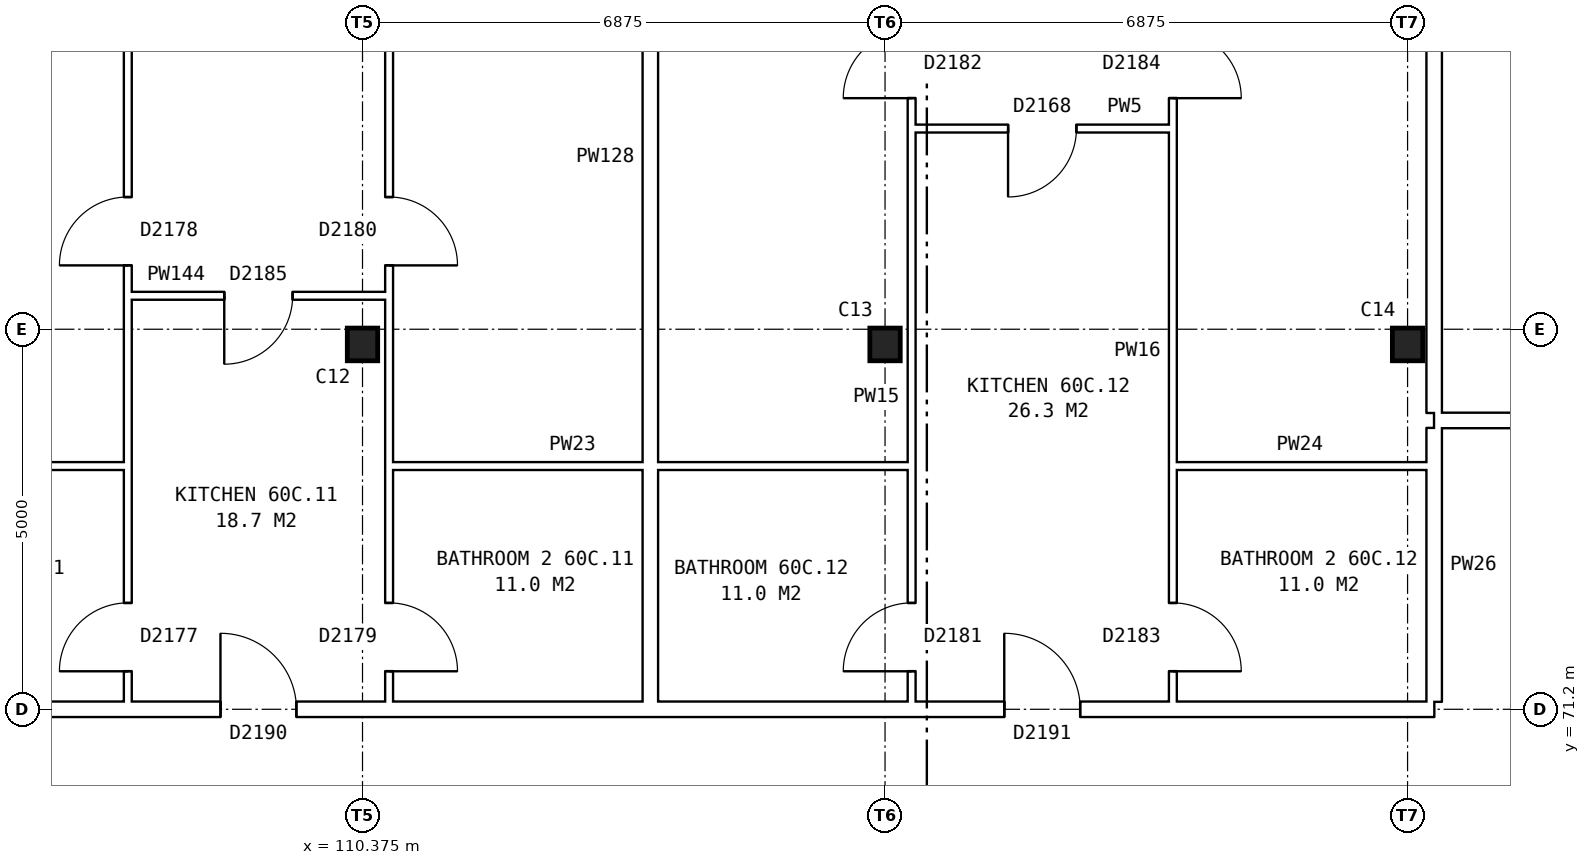
"""IFC4 building model, lengths in metres.
Left out: names, types, materials, properties, quantities, classifications, styles, units other than length and angle.
Written with IfcOpenShell. Run it as: python <this file> out.ifc"""

import sys

from ifc_helpers import new_model, si_unit, direction, frame, frame_2d, origin, origin_2d, place, context, subcontext, project, spatial, rectangle, i_section, extrude, element, fill, save


model = new_model("IFC4")
c1 = context("Model", 3, precision=1e-05, world=origin(), true_north=direction((0.0, 1.0)))
c2 = subcontext(c1, "Body", "Model", "MODEL_VIEW")
j1 = project(units=[si_unit("LENGTHUNIT", "METRE"), si_unit("PLANEANGLEUNIT", "RADIAN")], contexts=[c1])
p1 = place(None, origin())
s1 = spatial("IfcSite", under=j1, at=p1, CompositionType="ELEMENT")
p2 = place(p1, origin())
s2 = spatial("IfcBuilding", under=s1, at=p2, CompositionType="ELEMENT")
p3 = place(p2, frame((0.0, 0.0, 212.1)))
s3 = spatial("IfcBuildingStorey", under=s2, at=p3, CompositionType="ELEMENT", Elevation=212.1)
for number, where, z_axis, x_axis in (
    (1, (110.375, 76.0, 0.0), (0.0, 0.0, 1.0), (1.0, 0.0, 0.0)),
    (2, (117.25, 76.0, 0.0), (0.0, 0.0, 1.0), (1.0, 0.0, 0.0)),
    (3, (124.125, 76.0, 0.0), (0.0, 0.0, 1.0), (1.0, 0.0, 0.0)),
):
    element("IfcColumn", number, at=place(p3, frame(where, z_axis=z_axis, x_axis=x_axis)), inside=s3, PredefinedType="COLUMN", context=c2, shape_type="SweptSolid", body=[
        extrude(i_section(OverallWidth=0.4, OverallDepth=0.43, WebThickness=0.04, FlangeThickness=0.04, at=origin_2d()), origin(), (0.0, 0.0, 1.0), 2.85),
    ])
p4 = place(p3, frame((83.225, 71.2, 0.0), z_axis=(0.0, 0.0, 1.0), x_axis=(1.0, 0.0, 0.0)))
e4 = element("IfcWall", 4, at=p4, inside=s3, PredefinedType="PARTITIONING", context=c2, shape_type="SweptSolid", body=[
    extrude(rectangle(XDim=41.25, YDim=0.2, at=frame_2d((20.625, 0.0))), origin(), (0.0, 0.0, 1.0), 2.85),
])
p5 = place(p4, frame((4.656, 0.0, 0.0)))
e5 = element("IfcOpeningElement", 5, at=p5, cuts=e4, PredefinedType="OPENING", context=c2, shape_type="SweptSolid", body=[
    extrude(rectangle(XDim=1.0, YDim=2.1, at=frame_2d((0.5, 1.05))), frame((0.0, 0.11, 0.0), z_axis=(0.0, -1.0, 0.0), x_axis=(1.0, 0.0, 0.0)), (0.0, 0.0, 1.0), 0.22),
])
p6 = place(p4, frame((14.969, 0.0, 0.0)))
e6 = element("IfcOpeningElement", 6, at=p6, cuts=e4, PredefinedType="OPENING", context=c2, shape_type="SweptSolid", body=[
    extrude(rectangle(XDim=1.0, YDim=2.1, at=frame_2d((0.5, 1.05))), frame((0.0, 0.11, 0.0), z_axis=(0.0, -1.0, 0.0), x_axis=(1.0, 0.0, 0.0)), (0.0, 0.0, 1.0), 0.22),
])
p7 = place(p4, frame((25.281, 0.0, 0.0)))
e7 = element("IfcOpeningElement", 7, at=p7, cuts=e4, PredefinedType="OPENING", context=c2, shape_type="SweptSolid", body=[
    extrude(rectangle(XDim=1.0, YDim=2.1, at=frame_2d((0.5, 1.05))), frame((0.0, 0.11, 0.0), z_axis=(0.0, -1.0, 0.0), x_axis=(1.0, 0.0, 0.0)), (0.0, 0.0, 1.0), 0.22),
])
p8 = place(p4, frame((35.594, 0.0, 0.0)))
e8 = element("IfcOpeningElement", 8, at=p8, cuts=e4, PredefinedType="OPENING", context=c2, shape_type="SweptSolid", body=[
    extrude(rectangle(XDim=1.0, YDim=2.1, at=frame_2d((0.5, 1.05))), frame((0.0, 0.11, 0.0), z_axis=(0.0, -1.0, 0.0), x_axis=(1.0, 0.0, 0.0)), (0.0, 0.0, 1.0), 0.22),
])
for number, where, z_axis, x_axis in (
    (9, (100.412, 74.4, 0.0), (0.0, 0.0, 1.0), (1.0, 0.0, 0.0)),
    (10, (110.725, 74.4, 0.0), (0.0, 0.0, 1.0), (1.0, 0.0, 0.0)),
):
    element("IfcWall", number, at=place(p3, frame(where, z_axis=z_axis, x_axis=x_axis)), inside=s3, PredefinedType="PARTITIONING", context=c2, shape_type="SweptSolid", body=[
        extrude(rectangle(XDim=6.875, YDim=0.1, at=frame_2d((3.438, 0.0))), origin(), (0.0, 0.0, 1.0), 2.85),
    ])
p9 = place(p3, frame((121.037, 74.4, 0.0), z_axis=(0.0, 0.0, 1.0), x_axis=(1.0, 0.0, 0.0)))
e11 = element("IfcWall", 11, at=p9, inside=s3, PredefinedType="PARTITIONING", context=c2, shape_type="SweptSolid", body=[
    extrude(rectangle(XDim=3.338, YDim=0.1, at=frame_2d((1.669, 0.0))), origin(), (0.0, 0.0, 1.0), 2.85),
])
p10 = place(p3, frame((124.475, 75.0, 0.0), z_axis=(0.0, 0.0, 1.0), x_axis=(1.0, 0.0, 0.0)))
e12 = element("IfcWall", 12, at=p10, inside=s3, PredefinedType="PARTITIONING", context=c2, shape_type="SweptSolid", body=[
    extrude(rectangle(XDim=6.885, YDim=0.2, at=frame_2d((3.442, 0.0))), origin(), (0.0, 0.0, 1.0), 2.85),
])
p11 = place(p10, frame((2.992, 0.0, 0.0)))
e13 = element("IfcOpeningElement", 13, at=p11, cuts=e12, PredefinedType="OPENING", context=c2, shape_type="SweptSolid", body=[
    extrude(rectangle(XDim=0.9, YDim=2.1, at=frame_2d((0.45, 1.05))), frame((0.0, 0.11, 0.0), z_axis=(0.0, -1.0, 0.0), x_axis=(1.0, 0.0, 0.0)), (0.0, 0.0, 1.0), 0.22),
])
p12 = place(p3, frame((107.287, 76.64, 0.0), z_axis=(0.0, 0.0, 1.0), x_axis=(1.0, 0.0, 0.0)))
e14 = element("IfcWall", 14, at=p12, inside=s3, PredefinedType="PARTITIONING", context=c2, shape_type="SweptSolid", body=[
    extrude(rectangle(XDim=3.438, YDim=0.1, at=frame_2d((1.719, 0.0))), origin(), (0.0, 0.0, 1.0), 2.85),
])
p13 = place(p12, frame((1.269, 0.0, 0.0)))
e15 = element("IfcOpeningElement", 15, at=p13, cuts=e14, PredefinedType="OPENING", context=c2, shape_type="SweptSolid", body=[
    extrude(rectangle(XDim=0.9, YDim=2.1, at=frame_2d((0.45, 1.05))), frame((0.0, 0.06, 0.0), z_axis=(0.0, -1.0, 0.0), x_axis=(1.0, 0.0, 0.0)), (0.0, 0.0, 1.0), 0.12),
])
p14 = place(p3, frame((117.6, 78.84, 0.0), z_axis=(0.0, 0.0, 1.0), x_axis=(1.0, 0.0, 0.0)))
e16 = element("IfcWall", 16, at=p14, inside=s3, PredefinedType="PARTITIONING", context=c2, shape_type="SweptSolid", body=[
    extrude(rectangle(XDim=3.437, YDim=0.1, at=frame_2d((1.719, 0.0))), origin(), (0.0, 0.0, 1.0), 2.85),
])
p15 = place(p14, frame((1.269, 0.0, 0.0)))
e17 = element("IfcOpeningElement", 17, at=p15, cuts=e16, PredefinedType="OPENING", context=c2, shape_type="SweptSolid", body=[
    extrude(rectangle(XDim=0.9, YDim=2.1, at=frame_2d((0.45, 1.05))), frame((0.0, 0.06, 0.0), z_axis=(0.0, -1.0, 0.0), x_axis=(1.0, 0.0, 0.0)), (0.0, 0.0, 1.0), 0.12),
])
p16 = place(p3, frame((107.287, 71.3, 0.0), z_axis=(0.0, 0.0, 1.0), x_axis=(0.0, 1.0, 0.0)))
e18 = element("IfcWall", 18, at=p16, inside=s3, PredefinedType="PARTITIONING", context=c2, shape_type="SweptSolid", body=[
    extrude(rectangle(XDim=14.34, YDim=0.1, at=frame_2d((7.17, 0.0))), origin(), (0.0, 0.0, 1.0), 2.85),
])
p17 = place(p16, frame((5.74, 0.0, 0.0)))
e19 = element("IfcOpeningElement", 19, at=p17, cuts=e18, PredefinedType="OPENING", context=c2, shape_type="SweptSolid", body=[
    extrude(rectangle(XDim=0.9, YDim=2.1, at=frame_2d((0.45, 1.05))), frame((0.0, 0.06, 0.0), z_axis=(0.0, -1.0, 0.0), x_axis=(1.0, 0.0, 0.0)), (0.0, 0.0, 1.0), 0.12),
])
p18 = place(p16, frame((0.4, 0.0, 0.0)))
e20 = element("IfcOpeningElement", 20, at=p18, cuts=e18, PredefinedType="OPENING", context=c2, shape_type="SweptSolid", body=[
    extrude(rectangle(XDim=0.9, YDim=2.1, at=frame_2d((0.45, 1.05))), frame((0.0, 0.06, 0.0), z_axis=(0.0, -1.0, 0.0), x_axis=(1.0, 0.0, 0.0)), (0.0, 0.0, 1.0), 0.12),
])
p19 = place(p3, frame((110.725, 71.3, 0.0), z_axis=(0.0, 0.0, 1.0), x_axis=(0.0, 1.0, 0.0)))
e21 = element("IfcWall", 21, at=p19, inside=s3, PredefinedType="PARTITIONING", context=c2, shape_type="SweptSolid", body=[
    extrude(rectangle(XDim=14.34, YDim=0.1, at=frame_2d((7.17, 0.0))), origin(), (0.0, 0.0, 1.0), 2.85),
])
p20 = place(p19, frame((5.74, 0.0, 0.0)))
e22 = element("IfcOpeningElement", 22, at=p20, cuts=e21, PredefinedType="OPENING", context=c2, shape_type="SweptSolid", body=[
    extrude(rectangle(XDim=0.9, YDim=2.1, at=frame_2d((0.45, 1.05))), frame((0.0, 0.06, 0.0), z_axis=(0.0, -1.0, 0.0), x_axis=(1.0, 0.0, 0.0)), (0.0, 0.0, 1.0), 0.12),
])
p21 = place(p19, frame((0.4, 0.0, 0.0)))
e23 = element("IfcOpeningElement", 23, at=p21, cuts=e21, PredefinedType="OPENING", context=c2, shape_type="SweptSolid", body=[
    extrude(rectangle(XDim=0.9, YDim=2.1, at=frame_2d((0.45, 1.05))), frame((0.0, 0.06, 0.0), z_axis=(0.0, -1.0, 0.0), x_axis=(1.0, 0.0, 0.0)), (0.0, 0.0, 1.0), 0.12),
])
p22 = place(p3, frame((114.162, 71.3, 0.0), z_axis=(0.0, 0.0, 1.0), x_axis=(0.0, 1.0, 0.0)))
e24 = element("IfcWall", 24, at=p22, inside=s3, PredefinedType="PARTITIONING", context=c2, shape_type="SweptSolid", body=[
    extrude(rectangle(XDim=14.34, YDim=0.2, at=frame_2d((7.17, 0.0))), origin(), (0.0, 0.0, 1.0), 2.85),
])
p23 = place(p3, frame((117.6, 71.3, 0.0), z_axis=(0.0, 0.0, 1.0), x_axis=(0.0, 1.0, 0.0)))
e25 = element("IfcWall", 25, at=p23, inside=s3, PredefinedType="PARTITIONING", context=c2, shape_type="SweptSolid", body=[
    extrude(rectangle(XDim=14.34, YDim=0.1, at=frame_2d((7.17, 0.0))), origin(), (0.0, 0.0, 1.0), 2.85),
])
p24 = place(p23, frame((7.94, 0.0, 0.0)))
e26 = element("IfcOpeningElement", 26, at=p24, cuts=e25, PredefinedType="OPENING", context=c2, shape_type="SweptSolid", body=[
    extrude(rectangle(XDim=0.9, YDim=2.1, at=frame_2d((0.45, 1.05))), frame((0.0, 0.06, 0.0), z_axis=(0.0, -1.0, 0.0), x_axis=(1.0, 0.0, 0.0)), (0.0, 0.0, 1.0), 0.12),
])
p25 = place(p23, frame((0.4, 0.0, 0.0)))
e27 = element("IfcOpeningElement", 27, at=p25, cuts=e25, PredefinedType="OPENING", context=c2, shape_type="SweptSolid", body=[
    extrude(rectangle(XDim=0.9, YDim=2.1, at=frame_2d((0.45, 1.05))), frame((0.0, 0.06, 0.0), z_axis=(0.0, -1.0, 0.0), x_axis=(1.0, 0.0, 0.0)), (0.0, 0.0, 1.0), 0.12),
])
p26 = place(p3, frame((121.037, 71.3, 0.0), z_axis=(0.0, 0.0, 1.0), x_axis=(0.0, 1.0, 0.0)))
e28 = element("IfcWall", 28, at=p26, inside=s3, PredefinedType="PARTITIONING", context=c2, shape_type="SweptSolid", body=[
    extrude(rectangle(XDim=14.34, YDim=0.1, at=frame_2d((7.17, 0.0))), origin(), (0.0, 0.0, 1.0), 2.85),
])
p27 = place(p26, frame((7.94, 0.0, 0.0)))
e29 = element("IfcOpeningElement", 29, at=p27, cuts=e28, PredefinedType="OPENING", context=c2, shape_type="SweptSolid", body=[
    extrude(rectangle(XDim=0.9, YDim=2.1, at=frame_2d((0.45, 1.05))), frame((0.0, 0.06, 0.0), z_axis=(0.0, -1.0, 0.0), x_axis=(1.0, 0.0, 0.0)), (0.0, 0.0, 1.0), 0.12),
])
p28 = place(p26, frame((0.4, 0.0, 0.0)))
e30 = element("IfcOpeningElement", 30, at=p28, cuts=e28, PredefinedType="OPENING", context=c2, shape_type="SweptSolid", body=[
    extrude(rectangle(XDim=0.9, YDim=2.1, at=frame_2d((0.45, 1.05))), frame((0.0, 0.06, 0.0), z_axis=(0.0, -1.0, 0.0), x_axis=(1.0, 0.0, 0.0)), (0.0, 0.0, 1.0), 0.12),
])
p29 = place(p3, frame((124.475, 71.3, 0.0), z_axis=(0.0, 0.0, 1.0), x_axis=(0.0, 1.0, 0.0)))
e31 = element("IfcWall", 31, at=p29, inside=s3, PredefinedType="PARTITIONING", context=c2, shape_type="SweptSolid", body=[
    extrude(rectangle(XDim=3.6, YDim=0.2, at=frame_2d((1.8, 0.0))), origin(), (0.0, 0.0, 1.0), 2.85),
])
p30 = place(p3, frame((124.475, 75.1, 0.0), z_axis=(0.0, 0.0, 1.0), x_axis=(0.0, 1.0, 0.0)))
e32 = element("IfcWall", 32, at=p30, inside=s3, PredefinedType="PARTITIONING", context=c2, shape_type="SweptSolid", body=[
    extrude(rectangle(XDim=10.54, YDim=0.2, at=frame_2d((5.27, 0.0))), origin(), (0.0, 0.0, 1.0), 2.85),
])
p31 = place(p17, origin())
e33 = element("IfcDoor", 33, at=p31, inside=s3, OperationType="SINGLE_SWING_LEFT", PredefinedType="DOOR", context=c2, shape_type="SweptSolid", body=[
    extrude(rectangle(XDim=0.9, YDim=2.1, at=frame_2d((0.45, 1.05))), frame((0.0, 0.025, 0.0), z_axis=(0.0, -1.0, 0.0), x_axis=(1.0, 0.0, 0.0)), (0.0, 0.0, 1.0), 0.05),
])
fill(e19, e33)
p32 = place(p20, frame((0.9, 0.0, 0.0), z_axis=(0.0, 0.0, 1.0), x_axis=(-1.0, 0.0, 0.0)))
e34 = element("IfcDoor", 34, at=p32, inside=s3, OperationType="SINGLE_SWING_RIGHT", PredefinedType="DOOR", context=c2, shape_type="SweptSolid", body=[
    extrude(rectangle(XDim=0.9, YDim=2.1, at=frame_2d((0.45, 1.05))), frame((0.0, 0.025, 0.0), z_axis=(0.0, -1.0, 0.0), x_axis=(1.0, 0.0, 0.0)), (0.0, 0.0, 1.0), 0.05),
])
fill(e22, e34)
p33 = place(p7, origin())
e35 = element("IfcDoor", 35, at=p33, inside=s3, OperationType="SINGLE_SWING_LEFT", PredefinedType="DOOR", context=c2, shape_type="SweptSolid", body=[
    extrude(rectangle(XDim=1.0, YDim=2.1, at=frame_2d((0.5, 1.05))), frame((0.0, 0.025, 0.0), z_axis=(0.0, -1.0, 0.0), x_axis=(1.0, 0.0, 0.0)), (0.0, 0.0, 1.0), 0.05),
])
fill(e7, e35)
p34 = place(p13, frame((0.9, 0.0, 0.0), z_axis=(0.0, 0.0, 1.0), x_axis=(-1.0, 0.0, 0.0)))
e36 = element("IfcDoor", 36, at=p34, inside=s3, OperationType="SINGLE_SWING_RIGHT", PredefinedType="DOOR", context=c2, shape_type="SweptSolid", body=[
    extrude(rectangle(XDim=0.9, YDim=2.1, at=frame_2d((0.45, 1.05))), frame((0.0, 0.025, 0.0), z_axis=(0.0, -1.0, 0.0), x_axis=(1.0, 0.0, 0.0)), (0.0, 0.0, 1.0), 0.05),
])
fill(e15, e36)
p35 = place(p18, origin())
e37 = element("IfcDoor", 37, at=p35, inside=s3, OperationType="SINGLE_SWING_LEFT", PredefinedType="DOOR", context=c2, shape_type="SweptSolid", body=[
    extrude(rectangle(XDim=0.9, YDim=2.1, at=frame_2d((0.45, 1.05))), frame((0.0, 0.025, 0.0), z_axis=(0.0, -1.0, 0.0), x_axis=(1.0, 0.0, 0.0)), (0.0, 0.0, 1.0), 0.05),
])
fill(e20, e37)
p36 = place(p21, frame((0.9, 0.0, 0.0), z_axis=(0.0, 0.0, 1.0), x_axis=(-1.0, 0.0, 0.0)))
e38 = element("IfcDoor", 38, at=p36, inside=s3, OperationType="SINGLE_SWING_RIGHT", PredefinedType="DOOR", context=c2, shape_type="SweptSolid", body=[
    extrude(rectangle(XDim=0.9, YDim=2.1, at=frame_2d((0.45, 1.05))), frame((0.0, 0.025, 0.0), z_axis=(0.0, -1.0, 0.0), x_axis=(1.0, 0.0, 0.0)), (0.0, 0.0, 1.0), 0.05),
])
fill(e23, e38)
p37 = place(p24, origin())
e39 = element("IfcDoor", 39, at=p37, inside=s3, OperationType="SINGLE_SWING_LEFT", PredefinedType="DOOR", context=c2, shape_type="SweptSolid", body=[
    extrude(rectangle(XDim=0.9, YDim=2.1, at=frame_2d((0.45, 1.05))), frame((0.0, 0.025, 0.0), z_axis=(0.0, -1.0, 0.0), x_axis=(1.0, 0.0, 0.0)), (0.0, 0.0, 1.0), 0.05),
])
fill(e26, e39)
p38 = place(p27, frame((0.9, 0.0, 0.0), z_axis=(0.0, 0.0, 1.0), x_axis=(-1.0, 0.0, 0.0)))
e40 = element("IfcDoor", 40, at=p38, inside=s3, OperationType="SINGLE_SWING_RIGHT", PredefinedType="DOOR", context=c2, shape_type="SweptSolid", body=[
    extrude(rectangle(XDim=0.9, YDim=2.1, at=frame_2d((0.45, 1.05))), frame((0.0, 0.025, 0.0), z_axis=(0.0, -1.0, 0.0), x_axis=(1.0, 0.0, 0.0)), (0.0, 0.0, 1.0), 0.05),
])
fill(e29, e40)
p39 = place(p8, origin())
e41 = element("IfcDoor", 41, at=p39, inside=s3, OperationType="SINGLE_SWING_LEFT", PredefinedType="DOOR", context=c2, shape_type="SweptSolid", body=[
    extrude(rectangle(XDim=1.0, YDim=2.1, at=frame_2d((0.5, 1.05))), frame((0.0, 0.025, 0.0), z_axis=(0.0, -1.0, 0.0), x_axis=(1.0, 0.0, 0.0)), (0.0, 0.0, 1.0), 0.05),
])
fill(e8, e41)
p40 = place(p15, frame((0.9, 0.0, 0.0), z_axis=(0.0, 0.0, 1.0), x_axis=(-1.0, 0.0, 0.0)))
e42 = element("IfcDoor", 42, at=p40, inside=s3, OperationType="SINGLE_SWING_RIGHT", PredefinedType="DOOR", context=c2, shape_type="SweptSolid", body=[
    extrude(rectangle(XDim=0.9, YDim=2.1, at=frame_2d((0.45, 1.05))), frame((0.0, 0.025, 0.0), z_axis=(0.0, -1.0, 0.0), x_axis=(1.0, 0.0, 0.0)), (0.0, 0.0, 1.0), 0.05),
])
fill(e17, e42)
p41 = place(p25, origin())
e43 = element("IfcDoor", 43, at=p41, inside=s3, OperationType="SINGLE_SWING_LEFT", PredefinedType="DOOR", context=c2, shape_type="SweptSolid", body=[
    extrude(rectangle(XDim=0.9, YDim=2.1, at=frame_2d((0.45, 1.05))), frame((0.0, 0.025, 0.0), z_axis=(0.0, -1.0, 0.0), x_axis=(1.0, 0.0, 0.0)), (0.0, 0.0, 1.0), 0.05),
])
fill(e27, e43)
p42 = place(p28, frame((0.9, 0.0, 0.0), z_axis=(0.0, 0.0, 1.0), x_axis=(-1.0, 0.0, 0.0)))
e44 = element("IfcDoor", 44, at=p42, inside=s3, OperationType="SINGLE_SWING_RIGHT", PredefinedType="DOOR", context=c2, shape_type="SweptSolid", body=[
    extrude(rectangle(XDim=0.9, YDim=2.1, at=frame_2d((0.45, 1.05))), frame((0.0, 0.025, 0.0), z_axis=(0.0, -1.0, 0.0), x_axis=(1.0, 0.0, 0.0)), (0.0, 0.0, 1.0), 0.05),
])
fill(e30, e44)
save(model, sys.argv[1])
